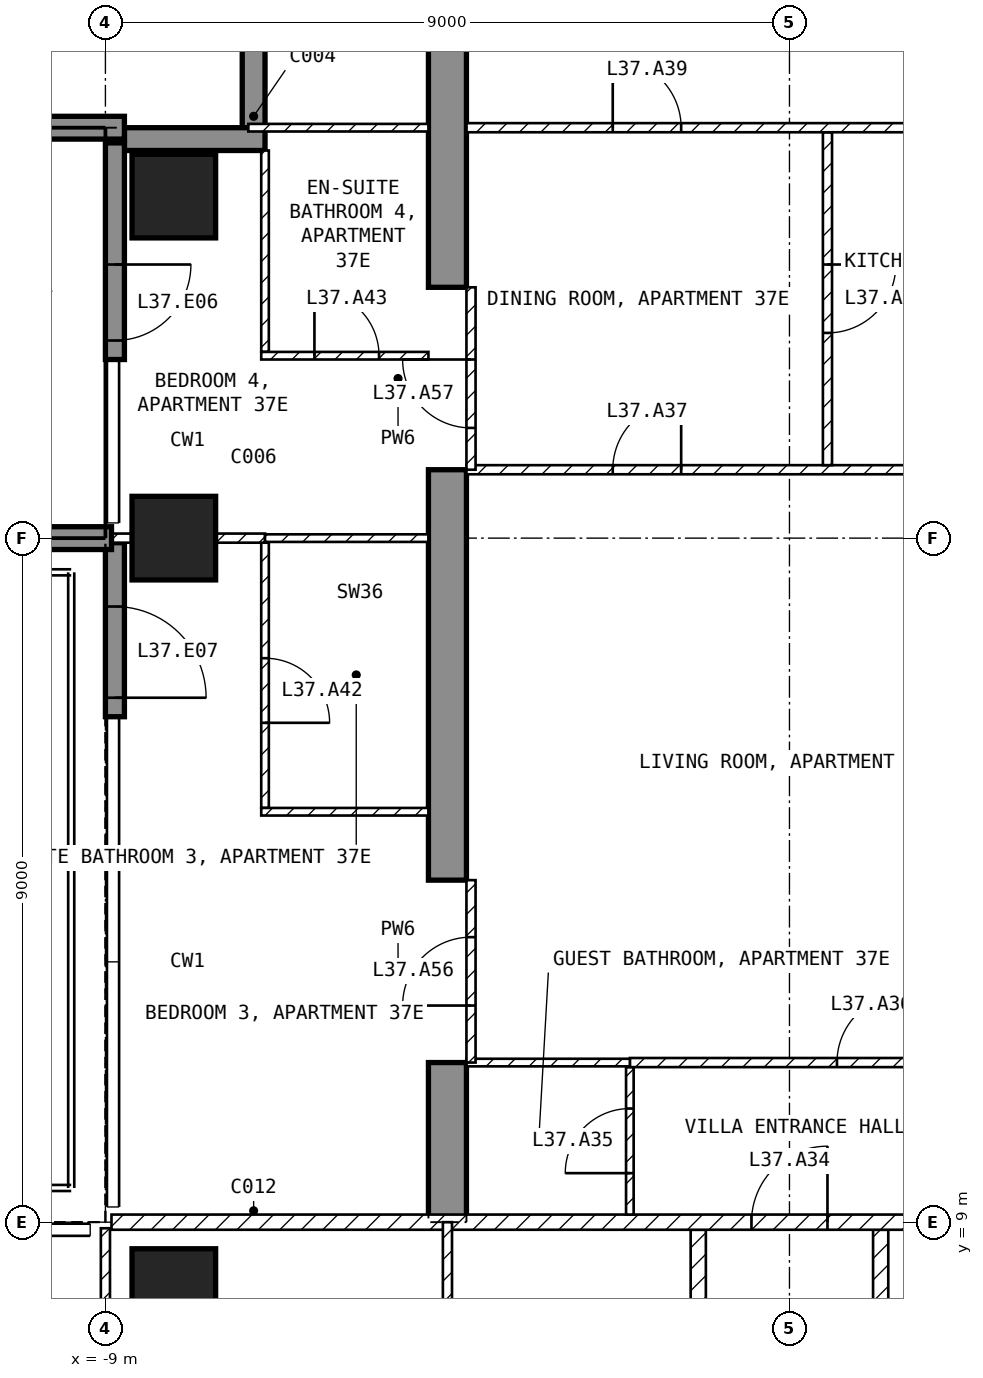
"""IFC4 building model, lengths in metres.
Left out: names, types, materials, properties, quantities, classifications, styles, units other than length and angle.
Written with IfcOpenShell. Run it as: python <this file> out.ifc"""

import sys

from ifc_helpers import new_model, si_unit, direction, frame, frame_2d, origin, origin_2d, place, context, subcontext, project, spatial, polyline, rectangle, outline, extrude, element, fill, save


model = new_model("IFC4")
c1 = context("Model", 3, precision=1e-05, world=origin(), true_north=direction((0.0, 1.0)))
c2 = subcontext(c1, "Body", "Model", "MODEL_VIEW")
j1 = project(units=[si_unit("LENGTHUNIT", "METRE"), si_unit("PLANEANGLEUNIT", "RADIAN")], contexts=[c1])
p1 = place(None, origin())
s1 = spatial("IfcSite", under=j1, at=p1, CompositionType="ELEMENT")
p2 = place(p1, origin())
s2 = spatial("IfcBuilding", under=s1, at=p2, CompositionType="ELEMENT")
p3 = place(p2, frame((0.0, 0.0, 151.4)))
s3 = spatial("IfcBuildingStorey", under=s2, at=p3, CompositionType="ELEMENT", Elevation=151.4)
for number, where, z_axis, x_axis in (
    (1, (-8.1, 8.1, -0.25), (0.0, 0.0, 1.0), (1.0, 0.0, 0.0)),
    (2, (-8.1, 18.0, -0.25), (0.0, 0.0, 1.0), (1.0, 0.0, 0.0)),
    (3, (-8.1, 22.5, -0.25), (0.0, 0.0, 1.0), (1.0, 0.0, 0.0)),
):
    element("IfcColumn", number, at=place(p3, frame(where, z_axis=z_axis, x_axis=x_axis)), inside=s3, PredefinedType="COLUMN", context=c2, shape_type="SweptSolid", body=[
        extrude(rectangle(XDim=1.1, YDim=1.1, at=origin_2d()), origin(), (0.0, 0.0, 1.0), 3.45),
    ])
p4 = place(p3, frame((-4.75, 9.0, -0.25), z_axis=(1.0, 0.0, 0.0), x_axis=(0.0, 1.0, 0.0)))
e4 = element("IfcWall", 4, at=p4, inside=s3, PredefinedType="SHEAR", context=c2, shape_type="SweptSolid", body=[
    extrude(outline(polyline([(0.0, 0.0), (2.1, 0.0), (2.1, 2.65), (4.5, 2.65), (4.5, 0.0), (9.9, 0.0), (9.9, 2.65), (12.3, 2.65), (12.3, 0.0), (16.55, 0.0), (16.55, 3.45), (0.0, 3.45), (0.0, 0.0)])), origin(), (0.0, 0.0, 1.0), 0.5),
])
p5 = place(p3, frame((-8.875, 23.2, 0.0), z_axis=(0.0, 0.0, 1.0), x_axis=(0.0, -1.0, 0.0)))
e5 = element("IfcWall", 5, at=p5, inside=s3, PredefinedType="SOLIDWALL", context=c2, shape_type="SweptSolid", body=[
    extrude(rectangle(XDim=2.85, YDim=0.25, at=frame_2d((1.425, 0.0))), origin(), (0.0, 0.0, 1.0), 3.2),
])
p6 = place(p5, frame((1.6, 0.0, 0.0)))
e6 = element("IfcOpeningElement", 6, at=p6, cuts=e5, PredefinedType="OPENING", context=c2, shape_type="SweptSolid", body=[
    extrude(rectangle(XDim=1.0, YDim=2.4, at=frame_2d((0.5, 1.2))), frame((0.0, 0.135, 0.0), z_axis=(0.0, -1.0, 0.0), x_axis=(1.0, 0.0, 0.0)), (0.0, 0.0, 1.0), 0.27),
])
p7 = place(p3, frame((-8.875, 17.94, 0.0), z_axis=(0.0, 0.0, 1.0), x_axis=(0.0, -1.0, 0.0)))
e7 = element("IfcWall", 7, at=p7, inside=s3, PredefinedType="SOLIDWALL", context=c2, shape_type="SweptSolid", body=[
    extrude(rectangle(XDim=2.29, YDim=0.25, at=frame_2d((1.145, 0.0))), origin(), (0.0, 0.0, 1.0), 3.2),
])
p8 = place(p7, frame((0.84, 0.0, 0.0)))
e8 = element("IfcOpeningElement", 8, at=p8, cuts=e7, PredefinedType="OPENING", context=c2, shape_type="SweptSolid", body=[
    extrude(rectangle(XDim=1.2, YDim=2.4, at=frame_2d((0.6, 1.2))), frame((0.0, 0.135, 0.0), z_axis=(0.0, -1.0, 0.0), x_axis=(1.0, 0.0, 0.0)), (0.0, 0.0, 1.0), 0.27),
])
p9 = place(p3, frame((-7.05, 25.2, 0.0), z_axis=(0.0, 0.0, 1.0), x_axis=(0.0, -1.0, 0.0)))
e9 = element("IfcWall", 9, at=p9, inside=s3, PredefinedType="SOLIDWALL", context=c2, shape_type="SweptSolid", body=[
    extrude(rectangle(XDim=1.8, YDim=0.3, at=frame_2d((0.9, 0.0))), origin(), (0.0, 0.0, 1.0), 3.2),
])
p10 = place(p3, frame((-6.9, 23.25, 0.0), z_axis=(0.0, 0.0, 1.0), x_axis=(-1.0, 0.0, 0.0)))
e10 = element("IfcWall", 10, at=p10, inside=s3, PredefinedType="SOLIDWALL", context=c2, shape_type="SweptSolid", body=[
    extrude(rectangle(XDim=1.85, YDim=0.3, at=frame_2d((0.925, 0.0))), origin(), (0.0, 0.0, 1.0), 3.2),
])
p11 = place(p3, frame((-8.92, 18.0, 0.0), z_axis=(0.0, 0.0, 1.0), x_axis=(-1.0, 0.0, 0.0)))
e11 = element("IfcWall", 11, at=p11, inside=s3, PredefinedType="SOLIDWALL", context=c2, shape_type="SweptSolid", body=[
    extrude(rectangle(XDim=2.82, YDim=0.3, at=frame_2d((1.41, 0.0))), origin(), (0.0, 0.0, 1.0), 3.2),
])
p12 = place(p3, frame((-8.75, 23.4, 0.0), z_axis=(0.0, 0.0, 1.0), x_axis=(-1.0, 0.0, 0.0)))
e12 = element("IfcWall", 12, at=p12, inside=s3, PredefinedType="SOLIDWALL", context=c2, shape_type="SweptSolid", body=[
    extrude(rectangle(XDim=2.95, YDim=0.3, at=frame_2d((1.475, 0.0))), origin(), (0.0, 0.0, 1.0), 3.2),
])
for number, where, z_axis, x_axis in (
    (13, (1.2, 8.9, 0.0), (0.0, 0.0, 1.0), (0.0, -1.0, 0.0)),
    (14, (-1.2, 4.6, 0.0), (0.0, 0.0, 1.0), (0.0, 1.0, 0.0)),
):
    element("IfcWall", number, at=place(p3, frame(where, z_axis=z_axis, x_axis=x_axis)), inside=s3, PredefinedType="PARTITIONING", context=c2, shape_type="SweptSolid", body=[
        extrude(rectangle(XDim=4.3, YDim=0.2, at=frame_2d((2.15, 0.0))), origin(), (0.0, 0.0, 1.0), 3.2),
    ])
p13 = place(p3, frame((-8.92, 9.0, 0.0), z_axis=(0.0, 0.0, 1.0), x_axis=(1.0, 0.0, 0.0)))
e15 = element("IfcWall", 15, at=p13, inside=s3, PredefinedType="PARTITIONING", context=c2, shape_type="SweptSolid", body=[
    extrude(rectangle(XDim=17.84, YDim=0.2, at=frame_2d((8.92, 0.0))), origin(), (0.0, 0.0, 1.0), 3.2),
])
p14 = place(p13, frame((8.42, 0.0, 0.0)))
e16 = element("IfcOpeningElement", 16, at=p14, cuts=e15, PredefinedType="OPENING", context=c2, shape_type="SweptSolid", body=[
    extrude(rectangle(XDim=1.0, YDim=2.1, at=frame_2d((0.5, 1.05))), frame((0.0, 0.11, 0.0), z_axis=(0.0, -1.0, 0.0), x_axis=(1.0, 0.0, 0.0)), (0.0, 0.0, 1.0), 0.22),
])
p15 = place(p3, frame((-9.0, 8.92, 0.0), z_axis=(0.0, 0.0, 1.0), x_axis=(0.0, -1.0, 0.0)))
e17 = element("IfcWall", 17, at=p15, inside=s3, PredefinedType="PARTITIONING", context=c2, shape_type="SweptSolid", body=[
    extrude(rectangle(XDim=7.62, YDim=0.12, at=frame_2d((3.81, 0.0))), origin(), (0.0, 0.0, 1.0), 3.2),
])
p16 = place(p15, frame((5.87, 0.0, 0.0)))
e18 = element("IfcOpeningElement", 18, at=p16, cuts=e17, PredefinedType="OPENING", context=c2, shape_type="SweptSolid", body=[
    extrude(rectangle(XDim=0.9, YDim=2.1, at=frame_2d((0.45, 1.05))), frame((0.0, 0.07, 0.0), z_axis=(0.0, -1.0, 0.0), x_axis=(1.0, 0.0, 0.0)), (0.0, 0.0, 1.0), 0.14),
])
p17 = place(p3, frame((-4.5, 9.0, 0.0), z_axis=(0.0, 0.0, 1.0), x_axis=(0.0, -1.0, 0.0)))
e19 = element("IfcWall", 19, at=p17, inside=s3, PredefinedType="PARTITIONING", context=c2, shape_type="SweptSolid", body=[
    extrude(rectangle(XDim=4.5, YDim=0.12, at=frame_2d((2.25, 0.0))), origin(), (0.0, 0.0, 1.0), 3.2),
])
p18 = place(p17, frame((1.8, 0.0, 0.0)))
e20 = element("IfcOpeningElement", 20, at=p18, cuts=e19, PredefinedType="OPENING", context=c2, shape_type="SweptSolid", body=[
    extrude(rectangle(XDim=0.9, YDim=2.1, at=frame_2d((0.45, 1.05))), frame((0.0, 0.07, 0.0), z_axis=(0.0, -1.0, 0.0), x_axis=(1.0, 0.0, 0.0)), (0.0, 0.0, 1.0), 0.14),
])
p19 = place(p3, frame((-2.1, 9.1, 0.0), z_axis=(0.0, 0.0, 1.0), x_axis=(0.0, 1.0, 0.0)))
e21 = element("IfcWall", 21, at=p19, inside=s3, PredefinedType="PARTITIONING", context=c2, shape_type="SweptSolid", body=[
    extrude(rectangle(XDim=1.94, YDim=0.1, at=frame_2d((0.97, 0.0))), origin(), (0.0, 0.0, 1.0), 3.2),
])
p20 = place(p19, frame((0.545, 0.0, 0.0)))
e22 = element("IfcOpeningElement", 22, at=p20, cuts=e21, PredefinedType="OPENING", context=c2, shape_type="SweptSolid", body=[
    extrude(rectangle(XDim=0.85, YDim=2.1, at=frame_2d((0.425, 1.05))), frame((0.0, 0.06, 0.0), z_axis=(0.0, -1.0, 0.0), x_axis=(1.0, 0.0, 0.0)), (0.0, 0.0, 1.0), 0.12),
])
p21 = place(p3, frame((-2.1, 11.1, 0.0), z_axis=(0.0, 0.0, 1.0), x_axis=(1.0, 0.0, 0.0)))
e23 = element("IfcWall", 23, at=p21, inside=s3, PredefinedType="PARTITIONING", context=c2, shape_type="SweptSolid", body=[
    extrude(rectangle(XDim=6.35, YDim=0.12, at=frame_2d((3.175, 0.0))), origin(), (0.0, 0.0, 1.0), 3.2),
])
p22 = place(p21, frame((2.725, 0.0, 0.0)))
e24 = element("IfcOpeningElement", 24, at=p22, cuts=e23, PredefinedType="OPENING", context=c2, shape_type="SweptSolid", body=[
    extrude(rectangle(XDim=0.9, YDim=2.1, at=frame_2d((0.45, 1.05))), frame((0.0, 0.07, 0.0), z_axis=(0.0, -1.0, 0.0), x_axis=(1.0, 0.0, 0.0)), (0.0, 0.0, 1.0), 0.14),
])
p23 = place(p3, frame((-4.25, 11.1, 0.0), z_axis=(0.0, 0.0, 1.0), x_axis=(1.0, 0.0, 0.0)))
e25 = element("IfcWall", 25, at=p23, inside=s3, PredefinedType="PARTITIONING", context=c2, shape_type="SweptSolid", body=[
    extrude(rectangle(XDim=2.15, YDim=0.1, at=frame_2d((1.075, 0.0))), origin(), (0.0, 0.0, 1.0), 3.2),
])
p24 = place(p3, frame((-4.25, 18.9, 0.0), z_axis=(0.0, 0.0, 1.0), x_axis=(1.0, 0.0, 0.0)))
e26 = element("IfcWall", 26, at=p24, inside=s3, PredefinedType="PARTITIONING", context=c2, shape_type="SweptSolid", body=[
    extrude(rectangle(XDim=8.5, YDim=0.12, at=frame_2d((4.25, 0.0))), origin(), (0.0, 0.0, 1.0), 3.2),
])
p25 = place(p24, frame((1.925, 0.0, 0.0)))
e27 = element("IfcOpeningElement", 27, at=p25, cuts=e26, PredefinedType="OPENING", context=c2, shape_type="SweptSolid", body=[
    extrude(rectangle(XDim=0.9, YDim=2.1, at=frame_2d((0.45, 1.05))), frame((0.0, 0.07, 0.0), z_axis=(0.0, -1.0, 0.0), x_axis=(1.0, 0.0, 0.0)), (0.0, 0.0, 1.0), 0.14),
])
p26 = place(p3, frame((0.5, 23.34, 0.0), z_axis=(0.0, 0.0, 1.0), x_axis=(0.0, -1.0, 0.0)))
e28 = element("IfcWall", 28, at=p26, inside=s3, PredefinedType="PARTITIONING", context=c2, shape_type="SweptSolid", body=[
    extrude(rectangle(XDim=4.38, YDim=0.12, at=frame_2d((2.19, 0.0))), origin(), (0.0, 0.0, 1.0), 3.2),
])
p27 = place(p26, frame((1.74, 0.0, 0.0)))
e29 = element("IfcOpeningElement", 29, at=p27, cuts=e28, PredefinedType="OPENING", context=c2, shape_type="SweptSolid", body=[
    extrude(rectangle(XDim=0.9, YDim=2.1, at=frame_2d((0.45, 1.05))), frame((0.0, 0.07, 0.0), z_axis=(0.0, -1.0, 0.0), x_axis=(1.0, 0.0, 0.0)), (0.0, 0.0, 1.0), 0.14),
])
p28 = place(p3, frame((-4.25, 23.4, 0.0), z_axis=(0.0, 0.0, 1.0), x_axis=(1.0, 0.0, 0.0)))
e30 = element("IfcWall", 30, at=p28, inside=s3, PredefinedType="PARTITIONING", context=c2, shape_type="SweptSolid", body=[
    extrude(rectangle(XDim=8.5, YDim=0.12, at=frame_2d((4.25, 0.0))), origin(), (0.0, 0.0, 1.0), 3.2),
])
p29 = place(p28, frame((1.925, 0.0, 0.0)))
e31 = element("IfcOpeningElement", 31, at=p29, cuts=e30, PredefinedType="OPENING", context=c2, shape_type="SweptSolid", body=[
    extrude(rectangle(XDim=0.9, YDim=2.1, at=frame_2d((0.45, 1.05))), frame((0.0, 0.07, 0.0), z_axis=(0.0, -1.0, 0.0), x_axis=(1.0, 0.0, 0.0)), (0.0, 0.0, 1.0), 0.14),
])
p30 = place(p3, frame((-6.9, 17.94, 0.0), z_axis=(0.0, 0.0, 1.0), x_axis=(0.0, -1.0, 0.0)))
e32 = element("IfcWall", 32, at=p30, inside=s3, PredefinedType="PARTITIONING", context=c2, shape_type="SweptSolid", body=[
    extrude(rectangle(XDim=3.49, YDim=0.1, at=frame_2d((1.745, 0.0))), origin(), (0.0, 0.0, 1.0), 3.2),
])
p31 = place(p30, frame((1.52, 0.0, 0.0)))
e33 = element("IfcOpeningElement", 33, at=p31, cuts=e32, PredefinedType="OPENING", context=c2, shape_type="SweptSolid", body=[
    extrude(rectangle(XDim=0.85, YDim=2.1, at=frame_2d((0.425, 1.05))), frame((0.0, 0.06, 0.0), z_axis=(0.0, -1.0, 0.0), x_axis=(1.0, 0.0, 0.0)), (0.0, 0.0, 1.0), 0.12),
])
p32 = place(p3, frame((-6.95, 14.4, 0.0), z_axis=(0.0, 0.0, 1.0), x_axis=(1.0, 0.0, 0.0)))
e34 = element("IfcWall", 34, at=p32, inside=s3, PredefinedType="PARTITIONING", context=c2, shape_type="SweptSolid", body=[
    extrude(rectangle(XDim=2.2, YDim=0.1, at=frame_2d((1.1, 0.0))), origin(), (0.0, 0.0, 1.0), 3.2),
])
p33 = place(p3, frame((-8.92, 18.0, 0.0), z_axis=(0.0, 0.0, 1.0), x_axis=(1.0, 0.0, 0.0)))
e35 = element("IfcWall", 35, at=p33, inside=s3, PredefinedType="PARTITIONING", context=c2, shape_type="SweptSolid", body=[
    extrude(rectangle(XDim=2.02, YDim=0.12, at=frame_2d((1.01, 0.0))), origin(), (0.0, 0.0, 1.0), 2.364),
])
p34 = place(p3, frame((-6.9, 18.0, 0.0), z_axis=(0.0, 0.0, 1.0), x_axis=(1.0, 0.0, 0.0)))
e36 = element("IfcWall", 36, at=p34, inside=s3, PredefinedType="PARTITIONING", context=c2, shape_type="SweptSolid", body=[
    extrude(rectangle(XDim=2.15, YDim=0.1, at=frame_2d((1.075, 0.0))), origin(), (0.0, 0.0, 1.0), 2.364),
])
p35 = place(p3, frame((-6.9, 23.1, 0.0), z_axis=(0.0, 0.0, 1.0), x_axis=(0.0, -1.0, 0.0)))
e37 = element("IfcWall", 37, at=p35, inside=s3, PredefinedType="PARTITIONING", context=c2, shape_type="SweptSolid", body=[
    extrude(rectangle(XDim=2.65, YDim=0.1, at=frame_2d((1.325, 0.0))), origin(), (0.0, 0.0, 1.0), 3.2),
])
p36 = place(p3, frame((-6.95, 20.4, 0.0), z_axis=(0.0, 0.0, 1.0), x_axis=(1.0, 0.0, 0.0)))
e38 = element("IfcWall", 38, at=p36, inside=s3, PredefinedType="PARTITIONING", context=c2, shape_type="SweptSolid", body=[
    extrude(rectangle(XDim=2.2, YDim=0.1, at=frame_2d((1.1, 0.0))), origin(), (0.0, 0.0, 1.0), 3.2),
])
p37 = place(p36, frame((0.7, 0.0, 0.0)))
e39 = element("IfcOpeningElement", 39, at=p37, cuts=e38, PredefinedType="OPENING", context=c2, shape_type="SweptSolid", body=[
    extrude(rectangle(XDim=0.85, YDim=2.1, at=frame_2d((0.425, 1.05))), frame((0.0, 0.06, 0.0), z_axis=(0.0, -1.0, 0.0), x_axis=(1.0, 0.0, 0.0)), (0.0, 0.0, 1.0), 0.12),
])
p38 = place(p3, frame((-7.12, 23.4, 0.0), z_axis=(0.0, 0.0, 1.0), x_axis=(1.0, 0.0, 0.0)))
e40 = element("IfcWall", 40, at=p38, inside=s3, PredefinedType="PARTITIONING", context=c2, shape_type="SweptSolid", body=[
    extrude(rectangle(XDim=2.37, YDim=0.1, at=frame_2d((1.185, 0.0))), origin(), (0.0, 0.0, 1.0), 3.2),
])
p39 = place(p3, frame((-4.19, 11.1, 0.0), z_axis=(0.0, 0.0, 1.0), x_axis=(0.0, 1.0, 0.0)))
e41 = element("IfcWall", 41, at=p39, inside=s3, PredefinedType="PARTITIONING", context=c2, shape_type="SweptSolid", body=[
    extrude(rectangle(XDim=2.4, YDim=0.12, at=frame_2d((1.2, 0.0))), origin(), (0.0, 0.0, 1.0), 2.4),
])
p40 = place(p39, frame((0.75, 0.0, 0.0)))
e42 = element("IfcOpeningElement", 42, at=p40, cuts=e41, PredefinedType="OPENING", context=c2, shape_type="SweptSolid", body=[
    extrude(rectangle(XDim=0.9, YDim=2.1, at=frame_2d((0.45, 1.05))), frame((0.0, 0.07, 0.0), z_axis=(0.0, -1.0, 0.0), x_axis=(1.0, 0.0, 0.0)), (0.0, 0.0, 1.0), 0.14),
])
p41 = place(p3, frame((-4.19, 18.9, 0.0), z_axis=(0.0, 0.0, 1.0), x_axis=(0.0, 1.0, 0.0)))
e43 = element("IfcWall", 43, at=p41, inside=s3, PredefinedType="PARTITIONING", context=c2, shape_type="SweptSolid", body=[
    extrude(rectangle(XDim=2.4, YDim=0.12, at=frame_2d((1.2, 0.0))), origin(), (0.0, 0.0, 1.0), 2.4),
])
p42 = place(p41, frame((0.55, 0.0, 0.0)))
e44 = element("IfcOpeningElement", 44, at=p42, cuts=e43, PredefinedType="OPENING", context=c2, shape_type="SweptSolid", body=[
    extrude(rectangle(XDim=0.9, YDim=2.1, at=frame_2d((0.45, 1.05))), frame((0.0, 0.07, 0.0), z_axis=(0.0, -1.0, 0.0), x_axis=(1.0, 0.0, 0.0)), (0.0, 0.0, 1.0), 0.14),
])
p43 = place(p6, origin())
e45 = element("IfcDoor", 45, at=p43, inside=s3, OperationType="SINGLE_SWING_LEFT", PredefinedType="DOOR", context=c2, shape_type="SweptSolid", body=[
    extrude(rectangle(XDim=1.0, YDim=2.4, at=frame_2d((0.5, 1.2))), frame((0.0, 0.025, 0.0), z_axis=(0.0, -1.0, 0.0), x_axis=(1.0, 0.0, 0.0)), (0.0, 0.0, 1.0), 0.05),
])
fill(e6, e45)
p44 = place(p8, origin())
e46 = element("IfcDoor", 46, at=p44, inside=s3, OperationType="SINGLE_SWING_RIGHT", PredefinedType="DOOR", context=c2, shape_type="SweptSolid", body=[
    extrude(rectangle(XDim=1.2, YDim=2.4, at=frame_2d((0.6, 1.2))), frame((0.0, 0.025, 0.0), z_axis=(0.0, -1.0, 0.0), x_axis=(1.0, 0.0, 0.0)), (0.0, 0.0, 1.0), 0.05),
])
fill(e8, e46)
p45 = place(p14, origin())
e47 = element("IfcDoor", 47, at=p45, inside=s3, OperationType="SINGLE_SWING_RIGHT", PredefinedType="DOOR", context=c2, shape_type="SweptSolid", body=[
    extrude(rectangle(XDim=1.0, YDim=2.1, at=frame_2d((0.5, 1.05))), frame((0.0, 0.025, 0.0), z_axis=(0.0, -1.0, 0.0), x_axis=(1.0, 0.0, 0.0)), (0.0, 0.0, 1.0), 0.05),
])
fill(e16, e47)
p46 = place(p20, origin())
e48 = element("IfcDoor", 48, at=p46, inside=s3, OperationType="SINGLE_SWING_LEFT", PredefinedType="DOOR", context=c2, shape_type="SweptSolid", body=[
    extrude(rectangle(XDim=0.85, YDim=2.1, at=frame_2d((0.425, 1.05))), frame((0.0, 0.025, 0.0), z_axis=(0.0, -1.0, 0.0), x_axis=(1.0, 0.0, 0.0)), (0.0, 0.0, 1.0), 0.05),
])
fill(e22, e48)
p47 = place(p22, origin())
e49 = element("IfcDoor", 49, at=p47, inside=s3, OperationType="SINGLE_SWING_RIGHT", PredefinedType="DOOR", context=c2, shape_type="SweptSolid", body=[
    extrude(rectangle(XDim=0.9, YDim=2.1, at=frame_2d((0.45, 1.05))), frame((0.0, 0.025, 0.0), z_axis=(0.0, -1.0, 0.0), x_axis=(1.0, 0.0, 0.0)), (0.0, 0.0, 1.0), 0.05),
])
fill(e24, e49)
p48 = place(p25, origin())
e50 = element("IfcDoor", 50, at=p48, inside=s3, OperationType="SINGLE_SWING_RIGHT", PredefinedType="DOOR", context=c2, shape_type="SweptSolid", body=[
    extrude(rectangle(XDim=0.9, YDim=2.1, at=frame_2d((0.45, 1.05))), frame((0.0, 0.025, 0.0), z_axis=(0.0, -1.0, 0.0), x_axis=(1.0, 0.0, 0.0)), (0.0, 0.0, 1.0), 0.05),
])
fill(e27, e50)
p49 = place(p27, origin())
e51 = element("IfcDoor", 51, at=p49, inside=s3, OperationType="SINGLE_SWING_LEFT", PredefinedType="DOOR", context=c2, shape_type="SweptSolid", body=[
    extrude(rectangle(XDim=0.9, YDim=2.1, at=frame_2d((0.45, 1.05))), frame((0.0, 0.025, 0.0), z_axis=(0.0, -1.0, 0.0), x_axis=(1.0, 0.0, 0.0)), (0.0, 0.0, 1.0), 0.05),
])
fill(e29, e51)
p50 = place(p29, origin())
e52 = element("IfcDoor", 52, at=p50, inside=s3, OperationType="SINGLE_SWING_LEFT", PredefinedType="DOOR", context=c2, shape_type="SweptSolid", body=[
    extrude(rectangle(XDim=0.9, YDim=2.1, at=frame_2d((0.45, 1.05))), frame((0.0, 0.025, 0.0), z_axis=(0.0, -1.0, 0.0), x_axis=(1.0, 0.0, 0.0)), (0.0, 0.0, 1.0), 0.05),
])
fill(e31, e52)
p51 = place(p31, origin())
e53 = element("IfcDoor", 53, at=p51, inside=s3, OperationType="SINGLE_SWING_RIGHT", PredefinedType="DOOR", context=c2, shape_type="SweptSolid", body=[
    extrude(rectangle(XDim=0.85, YDim=2.1, at=frame_2d((0.425, 1.05))), frame((0.0, 0.025, 0.0), z_axis=(0.0, -1.0, 0.0), x_axis=(1.0, 0.0, 0.0)), (0.0, 0.0, 1.0), 0.05),
])
fill(e33, e53)
p52 = place(p37, origin())
e54 = element("IfcDoor", 54, at=p52, inside=s3, OperationType="SINGLE_SWING_LEFT", PredefinedType="DOOR", context=c2, shape_type="SweptSolid", body=[
    extrude(rectangle(XDim=0.85, YDim=2.1, at=frame_2d((0.425, 1.05))), frame((0.0, 0.025, 0.0), z_axis=(0.0, -1.0, 0.0), x_axis=(1.0, 0.0, 0.0)), (0.0, 0.0, 1.0), 0.05),
])
fill(e39, e54)
p53 = place(p40, origin())
e55 = element("IfcDoor", 55, at=p53, inside=s3, OperationType="SINGLE_SWING_LEFT", PredefinedType="DOOR", context=c2, shape_type="SweptSolid", body=[
    extrude(rectangle(XDim=0.9, YDim=2.1, at=frame_2d((0.45, 1.05))), frame((0.0, 0.025, 0.0), z_axis=(0.0, -1.0, 0.0), x_axis=(1.0, 0.0, 0.0)), (0.0, 0.0, 1.0), 0.05),
])
fill(e42, e55)
p54 = place(p42, origin())
e56 = element("IfcDoor", 56, at=p54, inside=s3, OperationType="SINGLE_SWING_RIGHT", PredefinedType="DOOR", context=c2, shape_type="SweptSolid", body=[
    extrude(rectangle(XDim=0.9, YDim=2.1, at=frame_2d((0.45, 1.05))), frame((0.0, 0.025, 0.0), z_axis=(0.0, -1.0, 0.0), x_axis=(1.0, 0.0, 0.0)), (0.0, 0.0, 1.0), 0.05),
])
fill(e44, e56)
save(model, sys.argv[1])
